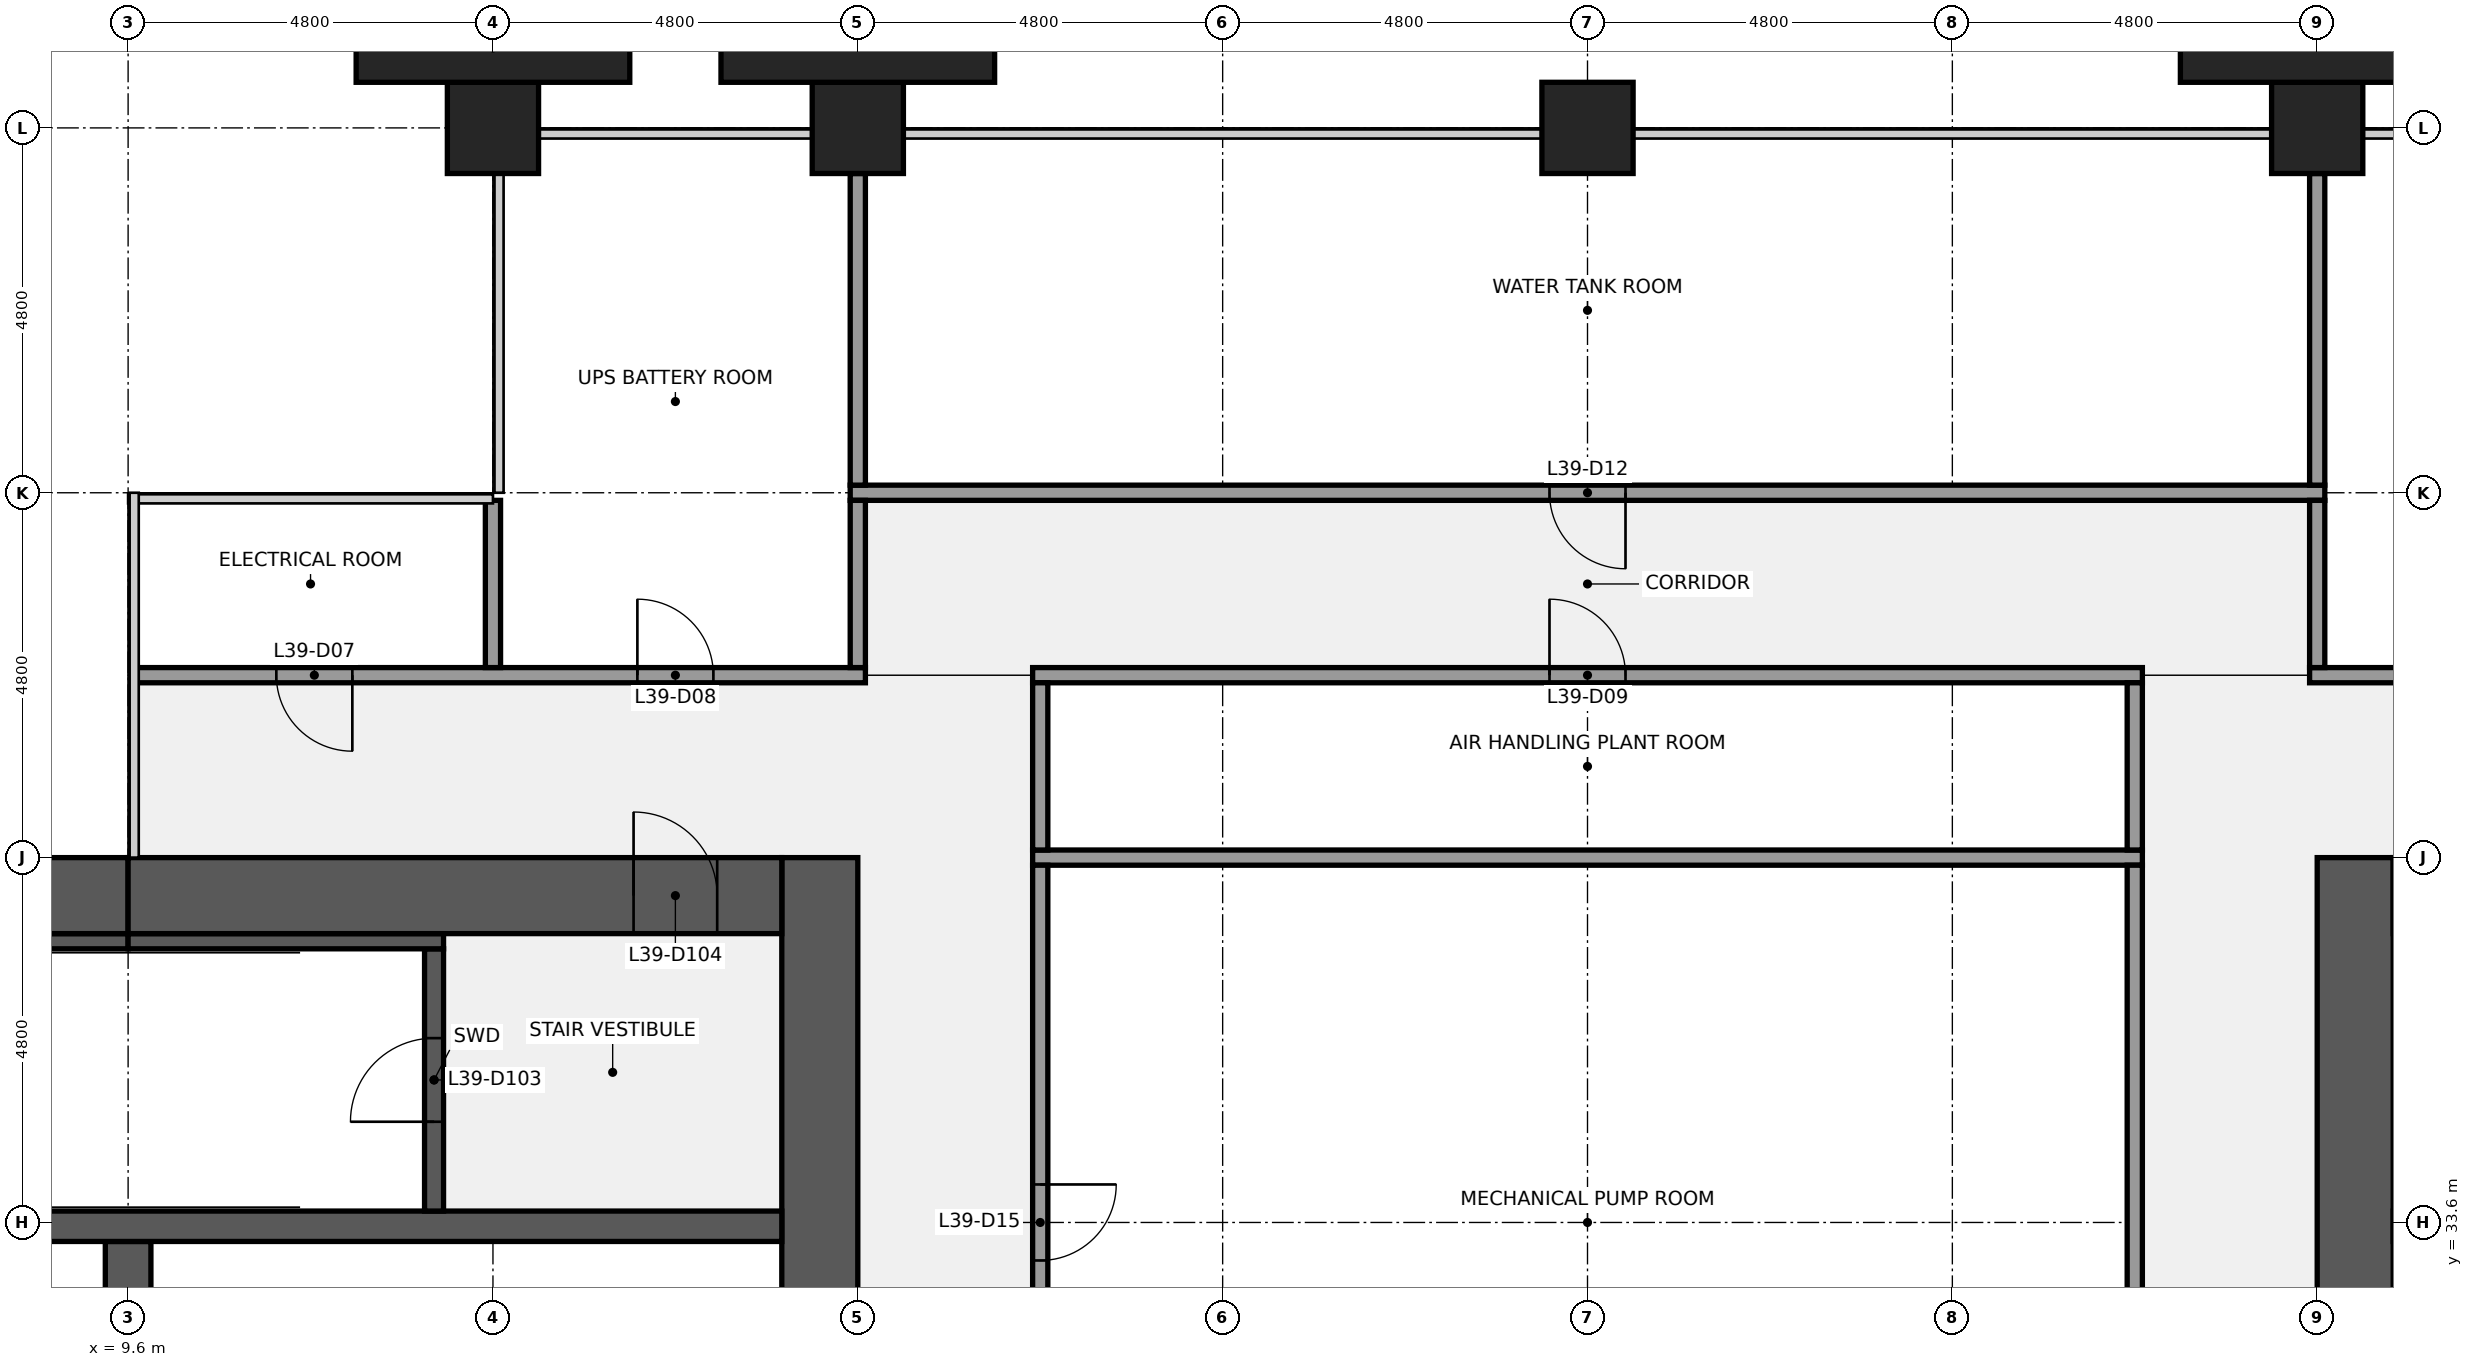
"""IFC4 building model, lengths in metres.
Left out: names, types, materials, properties, quantities, classifications, styles, units other than length and angle.
Written with IfcOpenShell. Run it as: python <this file> out.ifc"""

import sys

from ifc_helpers import new_model, si_unit, direction, frame, frame_2d, origin, origin_2d, place, context, subcontext, project, spatial, rectangle, extrude, element, fill, save


model = new_model("IFC4")
c1 = context("Model", 3, precision=1e-05, world=origin(), true_north=direction((0.0, 1.0)))
c2 = subcontext(c1, "Body", "Model", "MODEL_VIEW")
j1 = project(units=[si_unit("LENGTHUNIT", "METRE"), si_unit("PLANEANGLEUNIT", "RADIAN")], contexts=[c1])
p1 = place(None, origin())
s1 = spatial("IfcSite", under=j1, at=p1, CompositionType="ELEMENT")
p2 = place(p1, origin())
s2 = spatial("IfcBuilding", under=s1, at=p2, CompositionType="ELEMENT")
p3 = place(p2, frame((0.0, 0.0, 176.1)))
s3 = spatial("IfcBuildingStorey", under=s2, at=p3, CompositionType="ELEMENT", Elevation=176.1)
for number, where, z_axis, x_axis in (
    (1, (14.4, 48.0, 0.0), (0.0, 0.0, 1.0), (1.0, 0.0, 0.0)),
    (2, (19.2, 48.0, 0.0), (0.0, 0.0, 1.0), (1.0, 0.0, 0.0)),
    (3, (28.8, 48.0, 0.0), (0.0, 0.0, 1.0), (1.0, 0.0, 0.0)),
    (4, (38.4, 48.0, 0.0), (0.0, 0.0, 1.0), (1.0, 0.0, 0.0)),
):
    element("IfcColumn", number, at=place(p3, frame(where, z_axis=z_axis, x_axis=x_axis)), inside=s3, PredefinedType="COLUMN", context=c2, shape_type="SweptSolid", body=[
        extrude(rectangle(XDim=1.2, YDim=1.2, at=origin_2d()), origin(), (0.0, 0.0, 1.0), 4.5),
    ])
p4 = place(p3, frame((18.7, 38.4, 0.0), z_axis=(0.0, 0.0, 1.0), x_axis=(0.0, -1.0, 0.0)))
e5 = element("IfcWall", 5, at=p4, inside=s3, PredefinedType="SHEAR", context=c2, shape_type="SweptSolid", body=[
    extrude(rectangle(XDim=28.8, YDim=1.0, at=frame_2d((14.4, 0.0))), origin(), (0.0, 0.0, 1.0), 4.1),
])
p5 = place(p4, frame((18.3, 0.0, 0.0)))
e6 = element("IfcOpeningElement", 6, at=p5, cuts=e5, PredefinedType="OPENING", context=c2, shape_type="SweptSolid", body=[
    extrude(rectangle(XDim=1.8, YDim=2.1, at=frame_2d((0.9, 1.05))), frame((0.0, 0.51, 0.0), z_axis=(0.0, -1.0, 0.0), x_axis=(1.0, 0.0, 0.0)), (0.0, 0.0, 1.0), 1.02),
])
p6 = place(p4, frame((8.7, 0.0, 0.0)))
e7 = element("IfcOpeningElement", 7, at=p6, cuts=e5, PredefinedType="OPENING", context=c2, shape_type="SweptSolid", body=[
    extrude(rectangle(XDim=1.8, YDim=2.1, at=frame_2d((0.9, 1.05))), frame((0.0, 0.51, 0.0), z_axis=(0.0, -1.0, 0.0), x_axis=(1.0, 0.0, 0.0)), (0.0, 0.0, 1.0), 1.02),
])
p7 = place(p3, frame((9.6, 30.75, 0.0), z_axis=(0.0, 0.0, 1.0), x_axis=(0.0, 1.0, 0.0)))
e8 = element("IfcWall", 8, at=p7, inside=s3, PredefinedType="SHEAR", context=c2, shape_type="SweptSolid", body=[
    extrude(rectangle(XDim=2.6, YDim=0.6, at=frame_2d((1.3, 0.0))), origin(), (0.0, 0.0, 1.0), 4.1),
])
p8 = place(p3, frame((1.0, 33.55, 0.0), z_axis=(0.0, 0.0, 1.0), x_axis=(1.0, 0.0, 0.0)))
e9 = element("IfcWall", 9, at=p8, inside=s3, PredefinedType="SHEAR", context=c2, shape_type="SweptSolid", body=[
    extrude(rectangle(XDim=17.2, YDim=0.4, at=frame_2d((8.6, 0.0))), origin(), (0.0, 0.0, 1.0), 4.1),
])
p9 = place(p3, frame((13.625, 33.75, 0.0), z_axis=(0.0, 0.0, 1.0), x_axis=(0.0, 1.0, 0.0)))
e10 = element("IfcWall", 10, at=p9, inside=s3, PredefinedType="SHEAR", context=c2, shape_type="SweptSolid", body=[
    extrude(rectangle(XDim=3.45, YDim=0.25, at=frame_2d((1.725, 0.0))), origin(), (0.0, 0.0, 1.0), 4.1),
])
p10 = place(p9, frame((1.175, 0.0, 0.0)))
e11 = element("IfcOpeningElement", 11, at=p10, cuts=e10, PredefinedType="OPENING", context=c2, shape_type="SweptSolid", body=[
    extrude(rectangle(XDim=1.1, YDim=2.1, at=frame_2d((0.55, 1.05))), frame((0.0, 0.135, 0.0), z_axis=(0.0, -1.0, 0.0), x_axis=(1.0, 0.0, 0.0)), (0.0, 0.0, 1.0), 0.27),
])
p11 = place(p3, frame((6.25, 37.3, 0.0), z_axis=(0.0, 0.0, 1.0), x_axis=(1.0, 0.0, 0.0)))
e12 = element("IfcWall", 12, at=p11, inside=s3, PredefinedType="SHEAR", context=c2, shape_type="SweptSolid", body=[
    extrude(rectangle(XDim=3.35, YDim=0.2, at=frame_2d((1.675, 0.0))), origin(), (0.0, 0.0, 1.0), 4.1),
])
p12 = place(p3, frame((9.6, 37.3, 0.0), z_axis=(0.0, 0.0, 1.0), x_axis=(1.0, 0.0, 0.0)))
e13 = element("IfcWall", 13, at=p12, inside=s3, PredefinedType="SHEAR", context=c2, shape_type="SweptSolid", body=[
    extrude(rectangle(XDim=4.15, YDim=0.2, at=frame_2d((2.075, 0.0))), origin(), (0.0, 0.0, 1.0), 4.1),
])
p13 = place(p3, frame((1.0, 37.9, 0.0), z_axis=(0.0, 0.0, 1.0), x_axis=(1.0, 0.0, 0.0)))
e14 = element("IfcWall", 14, at=p13, inside=s3, PredefinedType="SHEAR", context=c2, shape_type="SweptSolid", body=[
    extrude(rectangle(XDim=8.6, YDim=1.0, at=frame_2d((4.3, 0.0))), origin(), (0.0, 0.0, 1.0), 4.1),
])
p14 = place(p13, frame((5.3, 0.0, 0.9)))
e15 = element("IfcOpeningElement", 15, at=p14, cuts=e14, PredefinedType="OPENING", context=c2, shape_type="SweptSolid", body=[
    extrude(rectangle(XDim=1.8, YDim=1.5, at=frame_2d((0.9, 0.75))), frame((0.0, 0.51, 0.0), z_axis=(0.0, -1.0, 0.0), x_axis=(1.0, 0.0, 0.0)), (0.0, 0.0, 1.0), 1.02),
])
p15 = place(p3, frame((9.6, 37.9, 0.0), z_axis=(0.0, 0.0, 1.0), x_axis=(1.0, 0.0, 0.0)))
e16 = element("IfcWall", 16, at=p15, inside=s3, PredefinedType="SHEAR", context=c2, shape_type="SweptSolid", body=[
    extrude(rectangle(XDim=8.6, YDim=1.0, at=frame_2d((4.3, 0.0))), origin(), (0.0, 0.0, 1.0), 4.1),
])
p16 = place(p15, frame((6.65, 0.0, 0.0)))
e17 = element("IfcOpeningElement", 17, at=p16, cuts=e16, PredefinedType="OPENING", context=c2, shape_type="SweptSolid", body=[
    extrude(rectangle(XDim=1.1, YDim=2.1, at=frame_2d((0.55, 1.05))), frame((0.0, 0.51, 0.0), z_axis=(0.0, -1.0, 0.0), x_axis=(1.0, 0.0, 0.0)), (0.0, 0.0, 1.0), 1.02),
])
p17 = place(p3, frame((38.9, 9.6, 0.0), z_axis=(0.0, 0.0, 1.0), x_axis=(0.0, 1.0, 0.0)))
e18 = element("IfcWall", 18, at=p17, inside=s3, PredefinedType="SHEAR", context=c2, shape_type="SweptSolid", body=[
    extrude(rectangle(XDim=28.8, YDim=1.0, at=frame_2d((14.4, 0.0))), origin(), (0.0, 0.0, 1.0), 4.1),
])
p18 = place(p17, frame((8.7, 0.0, 0.0)))
e19 = element("IfcOpeningElement", 19, at=p18, cuts=e18, PredefinedType="OPENING", context=c2, shape_type="SweptSolid", body=[
    extrude(rectangle(XDim=1.8, YDim=2.1, at=frame_2d((0.9, 1.05))), frame((0.0, 0.51, 0.0), z_axis=(0.0, -1.0, 0.0), x_axis=(1.0, 0.0, 0.0)), (0.0, 0.0, 1.0), 1.02),
])
p19 = place(p17, frame((18.3, 0.0, 0.0)))
e20 = element("IfcOpeningElement", 20, at=p19, cuts=e18, PredefinedType="OPENING", context=c2, shape_type="SweptSolid", body=[
    extrude(rectangle(XDim=1.8, YDim=2.1, at=frame_2d((0.9, 1.05))), frame((0.0, 0.51, 0.0), z_axis=(0.0, -1.0, 0.0), x_axis=(1.0, 0.0, 0.0)), (0.0, 0.0, 1.0), 1.02),
])
p20 = place(p3, frame((21.5, 38.4, 0.0), z_axis=(0.0, 0.0, 1.0), x_axis=(1.0, 0.0, 0.0)))
e21 = element("IfcWall", 21, at=p20, inside=s3, PredefinedType="PARTITIONING", context=c2, shape_type="SweptSolid", body=[
    extrude(rectangle(XDim=14.6, YDim=0.2, at=frame_2d((7.3, 0.0))), origin(), (0.0, 0.0, 1.0), 2.992),
])
p21 = place(p3, frame((9.7, 40.8, 0.0), z_axis=(0.0, 0.0, 1.0), x_axis=(1.0, 0.0, 0.0)))
e22 = element("IfcWall", 22, at=p21, inside=s3, PredefinedType="PARTITIONING", context=c2, shape_type="SweptSolid", body=[
    extrude(rectangle(XDim=9.6, YDim=0.2, at=frame_2d((4.8, 0.0))), origin(), (0.0, 0.0, 1.0), 2.992),
])
p22 = place(p21, frame((1.85, 0.0, 0.0)))
e23 = element("IfcOpeningElement", 23, at=p22, cuts=e22, PredefinedType="OPENING", context=c2, shape_type="SweptSolid", body=[
    extrude(rectangle(XDim=1.0, YDim=2.1, at=frame_2d((0.5, 1.05))), frame((0.0, 0.11, 0.0), z_axis=(0.0, -1.0, 0.0), x_axis=(1.0, 0.0, 0.0)), (0.0, 0.0, 1.0), 0.22),
])
p23 = place(p21, frame((6.6, 0.0, 0.0)))
e24 = element("IfcOpeningElement", 24, at=p23, cuts=e22, PredefinedType="OPENING", context=c2, shape_type="SweptSolid", body=[
    extrude(rectangle(XDim=1.0, YDim=2.1, at=frame_2d((0.5, 1.05))), frame((0.0, 0.11, 0.0), z_axis=(0.0, -1.0, 0.0), x_axis=(1.0, 0.0, 0.0)), (0.0, 0.0, 1.0), 0.22),
])
p24 = place(p3, frame((21.5, 40.8, 0.0), z_axis=(0.0, 0.0, 1.0), x_axis=(1.0, 0.0, 0.0)))
e25 = element("IfcWall", 25, at=p24, inside=s3, PredefinedType="PARTITIONING", context=c2, shape_type="SweptSolid", body=[
    extrude(rectangle(XDim=14.6, YDim=0.2, at=frame_2d((7.3, 0.0))), origin(), (0.0, 0.0, 1.0), 2.992),
])
p25 = place(p24, frame((6.8, 0.0, 0.0)))
e26 = element("IfcOpeningElement", 26, at=p25, cuts=e25, PredefinedType="OPENING", context=c2, shape_type="SweptSolid", body=[
    extrude(rectangle(XDim=1.0, YDim=2.1, at=frame_2d((0.5, 1.05))), frame((0.0, 0.11, 0.0), z_axis=(0.0, -1.0, 0.0), x_axis=(1.0, 0.0, 0.0)), (0.0, 0.0, 1.0), 0.22),
])
p26 = place(p3, frame((38.3, 40.8, 0.0), z_axis=(0.0, 0.0, 1.0), x_axis=(1.0, 0.0, 0.0)))
e27 = element("IfcWall", 27, at=p26, inside=s3, PredefinedType="PARTITIONING", context=c2, shape_type="SweptSolid", body=[
    extrude(rectangle(XDim=9.6, YDim=0.2, at=frame_2d((4.8, 0.0))), origin(), (0.0, 0.0, 1.0), 2.992),
])
p27 = place(p26, frame((2.0, 0.0, 0.0)))
e28 = element("IfcOpeningElement", 28, at=p27, cuts=e27, PredefinedType="OPENING", context=c2, shape_type="SweptSolid", body=[
    extrude(rectangle(XDim=1.0, YDim=2.1, at=frame_2d((0.5, 1.05))), frame((0.0, 0.11, 0.0), z_axis=(0.0, -1.0, 0.0), x_axis=(1.0, 0.0, 0.0)), (0.0, 0.0, 1.0), 0.22),
])
p28 = place(p26, frame((6.75, 0.0, 0.0)))
e29 = element("IfcOpeningElement", 29, at=p28, cuts=e27, PredefinedType="OPENING", context=c2, shape_type="SweptSolid", body=[
    extrude(rectangle(XDim=1.0, YDim=2.1, at=frame_2d((0.5, 1.05))), frame((0.0, 0.11, 0.0), z_axis=(0.0, -1.0, 0.0), x_axis=(1.0, 0.0, 0.0)), (0.0, 0.0, 1.0), 0.22),
])
p29 = place(p3, frame((19.1, 43.2, 0.0), z_axis=(0.0, 0.0, 1.0), x_axis=(1.0, 0.0, 0.0)))
e30 = element("IfcWall", 30, at=p29, inside=s3, PredefinedType="PARTITIONING", context=c2, shape_type="SweptSolid", body=[
    extrude(rectangle(XDim=19.4, YDim=0.2, at=frame_2d((9.7, 0.0))), origin(), (0.0, 0.0, 1.0), 2.992),
])
p30 = place(p29, frame((9.2, 0.0, 0.0)))
e31 = element("IfcOpeningElement", 31, at=p30, cuts=e30, PredefinedType="OPENING", context=c2, shape_type="SweptSolid", body=[
    extrude(rectangle(XDim=1.0, YDim=2.1, at=frame_2d((0.5, 1.05))), frame((0.0, 0.11, 0.0), z_axis=(0.0, -1.0, 0.0), x_axis=(1.0, 0.0, 0.0)), (0.0, 0.0, 1.0), 0.22),
])
for number, where, z_axis, x_axis in (
    (32, (14.4, 40.9, 0.0), (0.0, 0.0, 1.0), (0.0, 1.0, 0.0)),
    (33, (19.2, 40.9, 0.0), (0.0, 0.0, 1.0), (0.0, 1.0, 0.0)),
):
    element("IfcWall", number, at=place(p3, frame(where, z_axis=z_axis, x_axis=x_axis)), inside=s3, PredefinedType="PARTITIONING", context=c2, shape_type="SweptSolid", body=[
        extrude(rectangle(XDim=2.2, YDim=0.2, at=frame_2d((1.1, 0.0))), origin(), (0.0, 0.0, 1.0), 2.992),
    ])
p31 = place(p3, frame((19.2, 43.3, 0.0), z_axis=(0.0, 0.0, 1.0), x_axis=(0.0, 1.0, 0.0)))
e34 = element("IfcWall", 34, at=p31, inside=s3, PredefinedType="PARTITIONING", context=c2, shape_type="SweptSolid", body=[
    extrude(rectangle(XDim=4.1, YDim=0.2, at=frame_2d((2.05, 0.0))), origin(), (0.0, 0.0, 1.0), 2.992),
])
p32 = place(p3, frame((21.6, 28.9, 0.0), z_axis=(0.0, 0.0, 1.0), x_axis=(0.0, 1.0, 0.0)))
e35 = element("IfcWall", 35, at=p32, inside=s3, PredefinedType="PARTITIONING", context=c2, shape_type="SweptSolid", body=[
    extrude(rectangle(XDim=9.4, YDim=0.2, at=frame_2d((4.7, 0.0))), origin(), (0.0, 0.0, 1.0), 2.992),
])
p33 = place(p32, frame((4.2, 0.0, 0.0)))
e36 = element("IfcOpeningElement", 36, at=p33, cuts=e35, PredefinedType="OPENING", context=c2, shape_type="SweptSolid", body=[
    extrude(rectangle(XDim=1.0, YDim=2.1, at=frame_2d((0.5, 1.05))), frame((0.0, 0.11, 0.0), z_axis=(0.0, -1.0, 0.0), x_axis=(1.0, 0.0, 0.0)), (0.0, 0.0, 1.0), 0.22),
])
p34 = place(p3, frame((21.6, 38.5, 0.0), z_axis=(0.0, 0.0, 1.0), x_axis=(0.0, 1.0, 0.0)))
e37 = element("IfcWall", 37, at=p34, inside=s3, PredefinedType="PARTITIONING", context=c2, shape_type="SweptSolid", body=[
    extrude(rectangle(XDim=2.2, YDim=0.2, at=frame_2d((1.1, 0.0))), origin(), (0.0, 0.0, 1.0), 2.992),
])
p35 = place(p3, frame((36.0, 28.9, 0.0), z_axis=(0.0, 0.0, 1.0), x_axis=(0.0, 1.0, 0.0)))
e38 = element("IfcWall", 38, at=p35, inside=s3, PredefinedType="PARTITIONING", context=c2, shape_type="SweptSolid", body=[
    extrude(rectangle(XDim=9.4, YDim=0.2, at=frame_2d((4.7, 0.0))), origin(), (0.0, 0.0, 1.0), 2.992),
])
p36 = place(p3, frame((36.0, 38.5, 0.0), z_axis=(0.0, 0.0, 1.0), x_axis=(0.0, 1.0, 0.0)))
e39 = element("IfcWall", 39, at=p36, inside=s3, PredefinedType="PARTITIONING", context=c2, shape_type="SweptSolid", body=[
    extrude(rectangle(XDim=2.2, YDim=0.2, at=frame_2d((1.1, 0.0))), origin(), (0.0, 0.0, 1.0), 2.992),
])
p37 = place(p3, frame((38.4, 40.9, 0.0), z_axis=(0.0, 0.0, 1.0), x_axis=(0.0, 1.0, 0.0)))
e40 = element("IfcWall", 40, at=p37, inside=s3, PredefinedType="PARTITIONING", context=c2, shape_type="SweptSolid", body=[
    extrude(rectangle(XDim=2.2, YDim=0.2, at=frame_2d((1.1, 0.0))), origin(), (0.0, 0.0, 1.0), 2.992),
])
p38 = place(p3, frame((38.4, 43.3, 0.0), z_axis=(0.0, 0.0, 1.0), x_axis=(0.0, 1.0, 0.0)))
e41 = element("IfcWall", 41, at=p38, inside=s3, PredefinedType="PARTITIONING", context=c2, shape_type="SweptSolid", body=[
    extrude(rectangle(XDim=4.1, YDim=0.2, at=frame_2d((2.05, 0.0))), origin(), (0.0, 0.0, 1.0), 2.992),
])
for number, where, z_axis, x_axis in (
    (42, (14.4, 49.05, 0.0), (0.0, 0.0, 1.0), (1.0, 0.0, 0.0)),
    (43, (19.2, 49.05, 0.0), (0.0, 0.0, 1.0), (1.0, 0.0, 0.0)),
    (44, (38.4, 49.05, 0.0), (0.0, 0.0, 1.0), (1.0, 0.0, 0.0)),
):
    element("IfcColumn", number, at=place(p3, frame(where, z_axis=z_axis, x_axis=x_axis)), inside=s3, PredefinedType="PILASTER", context=c2, shape_type="SweptSolid", body=[
        extrude(rectangle(XDim=3.6, YDim=0.9, at=origin_2d()), origin(), (0.0, 0.0, 1.0), 4.5),
    ])
p39 = place(p10, origin())
e45 = element("IfcDoor", 45, at=p39, inside=s3, OperationType="SINGLE_SWING_LEFT", PredefinedType="DOOR", context=c2, shape_type="SweptSolid", body=[
    extrude(rectangle(XDim=1.1, YDim=2.1, at=frame_2d((0.55, 1.05))), frame((0.0, 0.025, 0.0), z_axis=(0.0, -1.0, 0.0), x_axis=(1.0, 0.0, 0.0)), (0.0, 0.0, 1.0), 0.05),
])
fill(e11, e45)
p40 = place(p16, origin())
e46 = element("IfcDoor", 46, at=p40, inside=s3, OperationType="SINGLE_SWING_LEFT", PredefinedType="DOOR", context=c2, shape_type="SweptSolid", body=[
    extrude(rectangle(XDim=1.1, YDim=2.1, at=frame_2d((0.55, 1.05))), frame((0.0, 0.025, 0.0), z_axis=(0.0, -1.0, 0.0), x_axis=(1.0, 0.0, 0.0)), (0.0, 0.0, 1.0), 0.05),
])
fill(e17, e46)
p41 = place(p22, origin())
e47 = element("IfcDoor", 47, at=p41, inside=s3, OperationType="SINGLE_SWING_RIGHT", PredefinedType="DOOR", context=c2, shape_type="SweptSolid", body=[
    extrude(rectangle(XDim=1.0, YDim=2.1, at=frame_2d((0.5, 1.05))), frame((0.0, 0.025, 0.0), z_axis=(0.0, -1.0, 0.0), x_axis=(1.0, 0.0, 0.0)), (0.0, 0.0, 1.0), 0.05),
])
fill(e23, e47)
p42 = place(p23, origin())
e48 = element("IfcDoor", 48, at=p42, inside=s3, OperationType="SINGLE_SWING_LEFT", PredefinedType="DOOR", context=c2, shape_type="SweptSolid", body=[
    extrude(rectangle(XDim=1.0, YDim=2.1, at=frame_2d((0.5, 1.05))), frame((0.0, 0.025, 0.0), z_axis=(0.0, -1.0, 0.0), x_axis=(1.0, 0.0, 0.0)), (0.0, 0.0, 1.0), 0.05),
])
fill(e24, e48)
p43 = place(p25, origin())
e49 = element("IfcDoor", 49, at=p43, inside=s3, OperationType="SINGLE_SWING_LEFT", PredefinedType="DOOR", context=c2, shape_type="SweptSolid", body=[
    extrude(rectangle(XDim=1.0, YDim=2.1, at=frame_2d((0.5, 1.05))), frame((0.0, 0.025, 0.0), z_axis=(0.0, -1.0, 0.0), x_axis=(1.0, 0.0, 0.0)), (0.0, 0.0, 1.0), 0.05),
])
fill(e26, e49)
p44 = place(p30, origin())
e50 = element("IfcDoor", 50, at=p44, inside=s3, OperationType="SINGLE_SWING_RIGHT", PredefinedType="DOOR", context=c2, shape_type="SweptSolid", body=[
    extrude(rectangle(XDim=1.0, YDim=2.1, at=frame_2d((0.5, 1.05))), frame((0.0, 0.025, 0.0), z_axis=(0.0, -1.0, 0.0), x_axis=(1.0, 0.0, 0.0)), (0.0, 0.0, 1.0), 0.05),
])
fill(e31, e50)
p45 = place(p33, origin())
e51 = element("IfcDoor", 51, at=p45, inside=s3, OperationType="SINGLE_SWING_RIGHT", PredefinedType="DOOR", context=c2, shape_type="SweptSolid", body=[
    extrude(rectangle(XDim=1.0, YDim=2.1, at=frame_2d((0.5, 1.05))), frame((0.0, 0.025, 0.0), z_axis=(0.0, -1.0, 0.0), x_axis=(1.0, 0.0, 0.0)), (0.0, 0.0, 1.0), 0.05),
])
fill(e36, e51)
save(model, sys.argv[1])
